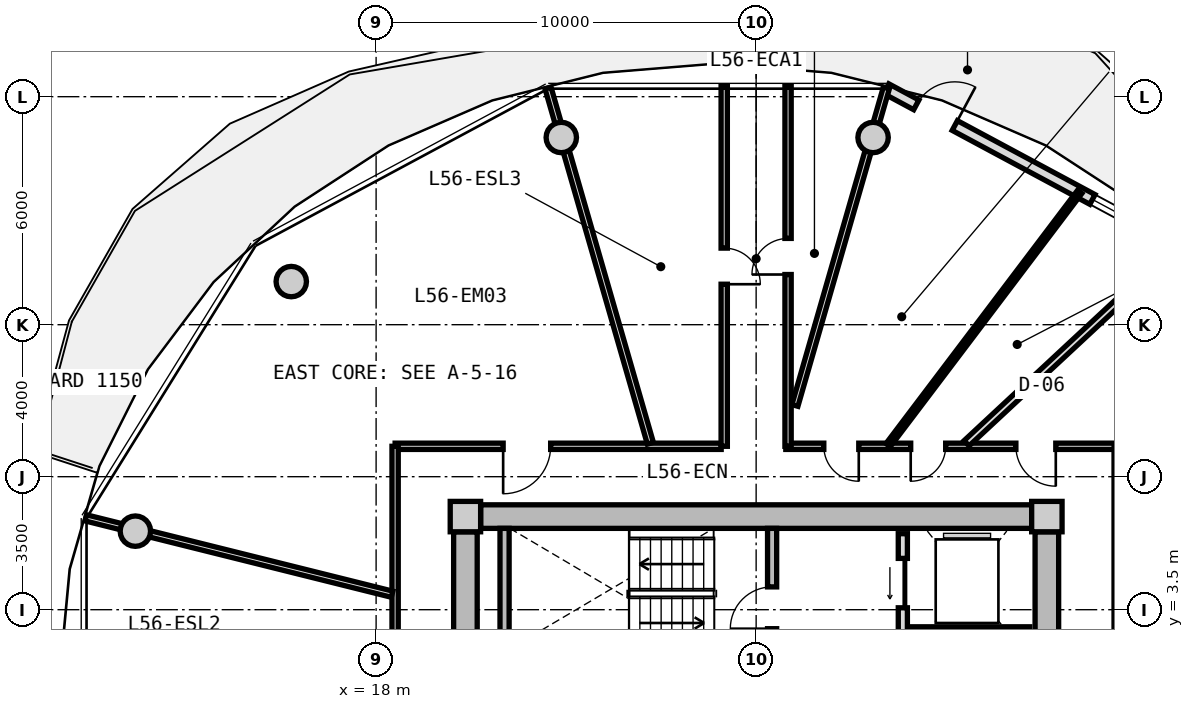
"""IFC4 building model, lengths in metres.
Left out: names, types, materials, properties, quantities, classifications, styles, units other than length and angle.
Written with IfcOpenShell. Run it as: python <this file> out.ifc"""

import sys

from ifc_helpers import new_model, si_unit, direction, frame, frame_2d, origin, origin_2d, place, context, subcontext, project, spatial, rectangle, circle, extrude, source, transform, mapped, element, fill, save


model = new_model("IFC4")
c1 = context("Model", 3, precision=1e-05, world=origin(), true_north=direction((0.0, 1.0)))
c2 = subcontext(c1, "Body", "Model", "MODEL_VIEW")
j1 = project(units=[si_unit("LENGTHUNIT", "METRE"), si_unit("PLANEANGLEUNIT", "RADIAN")], contexts=[c1])
p1 = place(None, origin())
s1 = spatial("IfcSite", under=j1, at=p1, CompositionType="ELEMENT")
p2 = place(p1, origin())
s2 = spatial("IfcBuilding", under=s1, at=p2, CompositionType="ELEMENT")
p3 = place(p2, frame((0.0, 0.0, 180.05)))
s3 = spatial("IfcBuildingStorey", under=s2, at=p3, CompositionType="ELEMENT", Elevation=180.05)
m1 = source(origin(), c2, "Body", "SweptSolid", [
    extrude(rectangle(XDim=0.8, YDim=0.8, at=origin_2d()), origin(), (0.0, 0.0, 1.0), 3.05),
])
for number, where, z_axis, x_axis in (
    (1, (35.65, 5.95, 0.0), (0.0, 0.0, 1.0), (1.0, 0.0, 0.0)),
    (2, (20.35, 5.95, 0.0), (0.0, 0.0, 1.0), (1.0, 0.0, 0.0)),
):
    element("IfcColumn", number, at=place(p3, frame(where, z_axis=z_axis, x_axis=x_axis)), inside=s3, PredefinedType="COLUMN", context=c2, shape_type="MappedRepresentation", body=[
        mapped(m1, transform((0.0, 0.0, 0.0), x_axis=(1.0, 0.0, 0.0), y_axis=(0.0, 1.0, 0.0), z_axis=(0.0, 0.0, 1.0), scale=1.0)),
    ])
m2 = source(origin(), c2, "Body", "SweptSolid", [
    extrude(rectangle(XDim=14.5, YDim=0.62, at=frame_2d((7.25, 0.0))), origin(), (0.0, 0.0, 1.0), 2.81),
])
p4 = place(p3, frame((20.75, 5.95, 0.0), z_axis=(0.0, 0.0, 1.0), x_axis=(1.0, 0.0, 0.0)))
e3 = element("IfcWall", 3, at=p4, inside=s3, PredefinedType="SHEAR", context=c2, shape_type="MappedRepresentation", body=[
    mapped(m2, transform((0.0, 0.0, 0.0), x_axis=(1.0, 0.0, 0.0), y_axis=(0.0, 1.0, 0.0), z_axis=(0.0, 0.0, 1.0), scale=1.0)),
])
m3 = source(origin(), c2, "Body", "SweptSolid", [
    extrude(rectangle(XDim=11.1, YDim=0.62, at=frame_2d((5.55, 0.0))), origin(), (0.0, 0.0, 1.0), 2.81),
])
p5 = place(p3, frame((20.35, -5.55, 0.0), z_axis=(0.0, 0.0, 1.0), x_axis=(0.0, 1.0, 0.0)))
e4 = element("IfcWall", 4, at=p5, inside=s3, PredefinedType="SHEAR", context=c2, shape_type="MappedRepresentation", body=[
    mapped(m3, transform((0.0, 0.0, 0.0), x_axis=(1.0, 0.0, 0.0), y_axis=(0.0, 1.0, 0.0), z_axis=(0.0, 0.0, 1.0), scale=1.0)),
])
p6 = place(p5, frame((3.8, 0.0, 0.0)))
e5 = element("IfcOpeningElement", 5, at=p6, cuts=e4, PredefinedType="OPENING", context=c2, shape_type="SweptSolid", body=[
    extrude(rectangle(XDim=1.2, YDim=2.15, at=frame_2d((0.6, 1.075))), frame((0.0, 0.32, 0.0), z_axis=(0.0, -1.0, 0.0), x_axis=(1.0, 0.0, 0.0)), (0.0, 0.0, 1.0), 0.64),
])
p7 = place(p3, frame((35.65, 5.55, 0.0), z_axis=(0.0, 0.0, 1.0), x_axis=(0.0, -1.0, 0.0)))
e6 = element("IfcWall", 6, at=p7, inside=s3, PredefinedType="SHEAR", context=c2, shape_type="MappedRepresentation", body=[
    mapped(m3, transform((0.0, 0.0, 0.0), x_axis=(1.0, 0.0, 0.0), y_axis=(0.0, 1.0, 0.0), z_axis=(0.0, 0.0, 1.0), scale=1.0)),
])
p8 = place(p7, frame((5.65, 0.0, 0.0)))
e7 = element("IfcOpeningElement", 7, at=p8, cuts=e6, PredefinedType="OPENING", context=c2, shape_type="SweptSolid", body=[
    extrude(rectangle(XDim=1.2, YDim=2.15, at=frame_2d((0.6, 1.075))), frame((0.0, 0.32, 0.0), z_axis=(0.0, -1.0, 0.0), x_axis=(1.0, 0.0, 0.0)), (0.0, 0.0, 1.0), 0.64),
])
m4 = source(origin(), c2, "Body", "SweptSolid", [
    extrude(circle(Radius=0.4, at=origin_2d()), origin(), (0.0, 0.0, 1.0), 3.05),
])
for number, where, z_axis, x_axis in (
    (8, (31.077, 15.926, 0.0), (0.0, 0.0, 1.0), (1.0, 0.0, 0.0)),
    (9, (22.873, 15.926, 0.0), (0.0, 0.0, 1.0), (1.0, 0.0, 0.0)),
    (10, (15.767, 12.135, 0.0), (0.0, 0.0, 1.0), (1.0, 0.0, 0.0)),
    (11, (11.665, 5.567, 0.0), (0.0, 0.0, 1.0), (1.0, 0.0, 0.0)),
):
    element("IfcColumn", number, at=place(p3, frame(where, z_axis=z_axis, x_axis=x_axis)), inside=s3, PredefinedType="COLUMN", context=c2, shape_type="MappedRepresentation", body=[
        mapped(m4, transform((0.0, 0.0, 0.0), x_axis=(1.0, 0.0, 0.0), y_axis=(0.0, 1.0, 0.0), z_axis=(0.0, 0.0, 1.0), scale=1.0)),
    ])
m5 = source(origin(), c2, "Body", "SweptSolid", [
    extrude(rectangle(XDim=8.742, YDim=0.29, at=frame_2d((4.371, 0.0))), origin(), (0.0, 0.0, 1.0), 2.81),
])
p9 = place(p3, frame((31.422, 17.211, 0.0), z_axis=(0.0, 0.0, 1.0), x_axis=(0.880992489116, -0.473130250693, 0.0)))
e12 = element("IfcWall", 12, at=p9, inside=s3, PredefinedType="SOLIDWALL", context=c2, shape_type="MappedRepresentation", body=[
    mapped(m5, transform((0.0, 0.0, 0.0), x_axis=(1.0, 0.0, 0.0), y_axis=(0.0, 1.0, 0.0), z_axis=(0.0, 0.0, 1.0), scale=1.0)),
])
p10 = place(p9, frame((0.9, 0.0, 0.0)))
e13 = element("IfcOpeningElement", 13, at=p10, cuts=e12, PredefinedType="OPENING", context=c2, shape_type="SweptSolid", body=[
    extrude(rectangle(XDim=1.15, YDim=2.25, at=frame_2d((0.575, 1.125))), frame((0.0, 0.155, 0.0), z_axis=(0.0, -1.0, 0.0), x_axis=(1.0, 0.0, 0.0)), (0.0, 0.0, 1.0), 0.31),
])
p11 = place(p9, frame((6.161, 0.0, 0.85)))
e14 = element("IfcOpeningElement", 14, at=p11, cuts=e12, PredefinedType="OPENING", context=c2, shape_type="SweptSolid", body=[
    extrude(rectangle(XDim=1.2, YDim=1.5, at=frame_2d((0.6, 0.75))), frame((0.0, 0.155, 0.0), z_axis=(0.0, -1.0, 0.0), x_axis=(1.0, 0.0, 0.0)), (0.0, 0.0, 1.0), 0.31),
])
m6 = source(origin(), c2, "Body", "SweptSolid", [
    extrude(rectangle(XDim=3.19, YDim=0.24, at=frame_2d((1.595, 0.0))), origin(), (0.0, 0.0, 1.0), 2.81),
])
p12 = place(p3, frame((21.38, 2.45, 0.0), z_axis=(0.0, 0.0, 1.0), x_axis=(0.0, 1.0, 0.0)))
e15 = element("IfcWall", 15, at=p12, inside=s3, PredefinedType="PARTITIONING", context=c2, shape_type="MappedRepresentation", body=[
    mapped(m6, transform((0.0, 0.0, 0.0), x_axis=(1.0, 0.0, 0.0), y_axis=(0.0, 1.0, 0.0), z_axis=(0.0, 0.0, 1.0), scale=1.0)),
])
p13 = place(p3, frame((28.42, 2.45, 0.0), z_axis=(0.0, 0.0, 1.0), x_axis=(0.0, 1.0, 0.0)))
e16 = element("IfcWall", 16, at=p13, inside=s3, PredefinedType="PARTITIONING", context=c2, shape_type="MappedRepresentation", body=[
    mapped(m6, transform((0.0, 0.0, 0.0), x_axis=(1.0, 0.0, 0.0), y_axis=(0.0, 1.0, 0.0), z_axis=(0.0, 0.0, 1.0), scale=1.0)),
])
p14 = place(p13, frame((0.55, 0.0, 0.0)))
e17 = element("IfcOpeningElement", 17, at=p14, cuts=e16, PredefinedType="OPENING", context=c2, shape_type="SweptSolid", body=[
    extrude(rectangle(XDim=1.1, YDim=2.15, at=frame_2d((0.55, 1.075))), frame((0.0, 0.13, 0.0), z_axis=(0.0, -1.0, 0.0), x_axis=(1.0, 0.0, 0.0)), (0.0, 0.0, 1.0), 0.26),
])
m7 = source(origin(), c2, "Body", "SweptSolid", [
    extrude(rectangle(XDim=5.0, YDim=0.24, at=frame_2d((2.5, 0.0))), origin(), (0.0, 0.0, 1.0), 2.795),
])
p15 = place(p3, frame((31.86, 0.5, 0.0), z_axis=(0.0, 0.0, 1.0), x_axis=(0.0, 1.0, 0.0)))
e18 = element("IfcWall", 18, at=p15, inside=s3, PredefinedType="PARTITIONING", context=c2, shape_type="MappedRepresentation", body=[
    mapped(m7, transform((0.0, 0.0, 0.0), x_axis=(1.0, 0.0, 0.0), y_axis=(0.0, 1.0, 0.0), z_axis=(0.0, 0.0, 1.0), scale=1.0)),
])
p16 = place(p15, frame((3.05, 0.0, 0.0)))
e19 = element("IfcOpeningElement", 19, at=p16, cuts=e18, PredefinedType="OPENING", context=c2, shape_type="SweptSolid", body=[
    extrude(rectangle(XDim=1.3, YDim=2.2, at=frame_2d((0.65, 1.1))), frame((0.0, 0.13, 0.0), z_axis=(0.0, -1.0, 0.0), x_axis=(1.0, 0.0, 0.0)), (0.0, 0.0, 1.0), 0.26),
])
p17 = place(p15, frame((0.55, 0.0, 0.0)))
e20 = element("IfcOpeningElement", 20, at=p17, cuts=e18, PredefinedType="OPENING", context=c2, shape_type="SweptSolid", body=[
    extrude(rectangle(XDim=1.3, YDim=2.2, at=frame_2d((0.65, 1.1))), frame((0.0, 0.13, 0.0), z_axis=(0.0, -1.0, 0.0), x_axis=(1.0, 0.0, 0.0)), (0.0, 0.0, 1.0), 0.26),
])
m8 = source(origin(), c2, "Body", "SweptSolid", [
    extrude(rectangle(XDim=3.2, YDim=0.2, at=frame_2d((1.6, 0.0))), origin(), (0.0, 0.0, 1.0), 2.795),
])
p18 = place(p3, frame((32.0, 2.95, 0.0), z_axis=(0.0, 0.0, 1.0), x_axis=(1.0, 0.0, 0.0)))
e21 = element("IfcWall", 21, at=p18, inside=s3, PredefinedType="PARTITIONING", context=c2, shape_type="MappedRepresentation", body=[
    mapped(m8, transform((0.0, 0.0, 0.0), x_axis=(1.0, 0.0, 0.0), y_axis=(0.0, 1.0, 0.0), z_axis=(0.0, 0.0, 1.0), scale=1.0)),
])
m9 = source(origin(), c2, "Body", "SweptSolid", [
    extrude(rectangle(XDim=8.58, YDim=0.165, at=frame_2d((4.29, 0.0))), origin(), (0.0, 0.0, 1.0), 2.795),
])
p19 = place(p3, frame((18.5, 7.8, 0.0), z_axis=(0.0, 0.0, 1.0), x_axis=(1.0, 0.0, 0.0)))
e22 = element("IfcWall", 22, at=p19, inside=s3, PredefinedType="PARTITIONING", context=c2, shape_type="MappedRepresentation", body=[
    mapped(m9, transform((0.0, 0.0, 0.0), x_axis=(1.0, 0.0, 0.0), y_axis=(0.0, 1.0, 0.0), z_axis=(0.0, 0.0, 1.0), scale=1.0)),
])
p20 = place(p19, frame((2.843, 0.0, 0.0)))
e23 = element("IfcOpeningElement", 23, at=p20, cuts=e22, PredefinedType="OPENING", context=c2, shape_type="SweptSolid", body=[
    extrude(rectangle(XDim=1.25, YDim=2.2, at=frame_2d((0.625, 1.1))), frame((0.0, 0.093, 0.0), z_axis=(0.0, -1.0, 0.0), x_axis=(1.0, 0.0, 0.0)), (0.0, 0.0, 1.0), 0.185),
])
m10 = source(origin(), c2, "Body", "SweptSolid", [
    extrude(rectangle(XDim=8.719, YDim=0.165, at=frame_2d((4.36, 0.0))), origin(), (0.0, 0.0, 1.0), 2.795),
])
p21 = place(p3, frame((28.781, 7.8, 0.0), z_axis=(0.0, 0.0, 1.0), x_axis=(1.0, 0.0, 0.0)))
e24 = element("IfcWall", 24, at=p21, inside=s3, PredefinedType="PARTITIONING", context=c2, shape_type="MappedRepresentation", body=[
    mapped(m10, transform((0.0, 0.0, 0.0), x_axis=(1.0, 0.0, 0.0), y_axis=(0.0, 1.0, 0.0), z_axis=(0.0, 0.0, 1.0), scale=1.0)),
])
p22 = place(p21, frame((6.054, 0.0, 0.0)))
e25 = element("IfcOpeningElement", 25, at=p22, cuts=e24, PredefinedType="OPENING", context=c2, shape_type="SweptSolid", body=[
    extrude(rectangle(XDim=1.05, YDim=2.15, at=frame_2d((0.525, 1.075))), frame((0.0, 0.093, 0.0), z_axis=(0.0, -1.0, 0.0), x_axis=(1.0, 0.0, 0.0)), (0.0, 0.0, 1.0), 0.185),
])
p23 = place(p21, frame((3.287, 0.0, 0.0)))
e26 = element("IfcOpeningElement", 26, at=p23, cuts=e24, PredefinedType="OPENING", context=c2, shape_type="SweptSolid", body=[
    extrude(rectangle(XDim=0.92, YDim=2.1, at=frame_2d((0.46, 1.05))), frame((0.0, 0.093, 0.0), z_axis=(0.0, -1.0, 0.0), x_axis=(1.0, 0.0, 0.0)), (0.0, 0.0, 1.0), 0.185),
])
p24 = place(p21, frame((1.0, 0.0, 0.0)))
e27 = element("IfcOpeningElement", 27, at=p24, cuts=e24, PredefinedType="OPENING", context=c2, shape_type="SweptSolid", body=[
    extrude(rectangle(XDim=0.92, YDim=2.1, at=frame_2d((0.46, 1.05))), frame((0.0, 0.093, 0.0), z_axis=(0.0, -1.0, 0.0), x_axis=(1.0, 0.0, 0.0)), (0.0, 0.0, 1.0), 0.185),
])
m11 = source(origin(), c2, "Body", "SweptSolid", [
    extrude(rectangle(XDim=6.88, YDim=0.165, at=frame_2d((3.44, 0.0))), origin(), (0.0, 0.0, 1.0), 2.795),
])
p25 = place(p3, frame((18.5, 0.92, 0.0), z_axis=(0.0, 0.0, 1.0), x_axis=(0.0, 1.0, 0.0)))
e28 = element("IfcWall", 28, at=p25, inside=s3, PredefinedType="PARTITIONING", context=c2, shape_type="MappedRepresentation", body=[
    mapped(m11, transform((0.0, 0.0, 0.0), x_axis=(1.0, 0.0, 0.0), y_axis=(0.0, 1.0, 0.0), z_axis=(0.0, 0.0, 1.0), scale=1.0)),
])
m12 = source(origin(), c2, "Body", "SweptSolid", [
    extrude(rectangle(XDim=8.695, YDim=0.165, at=frame_2d((4.348, 0.0))), origin(), (0.0, 0.0, 1.0), 2.345),
])
p26 = place(p3, frame((29.02, 8.875, 0.0), z_axis=(0.0, 0.0, 1.0), x_axis=(0.276797231892, 0.960928349263, 0.0)))
e29 = element("IfcWall", 29, at=p26, inside=s3, PredefinedType="PARTITIONING", context=c2, shape_type="MappedRepresentation", body=[
    mapped(m12, transform((0.0, 0.0, 0.0), x_axis=(1.0, 0.0, 0.0), y_axis=(0.0, 1.0, 0.0), z_axis=(0.0, 0.0, 1.0), scale=1.0)),
])
m13 = source(origin(), c2, "Body", "SweptSolid", [
    extrude(rectangle(XDim=9.73, YDim=0.165, at=frame_2d((4.865, 0.0))), origin(), (0.0, 0.0, 1.0), 2.435),
])
p27 = place(p3, frame((25.217, 7.88, 0.0), z_axis=(0.0, 0.0, 1.0), x_axis=(-0.27679492614, 0.960929013436, 0.0)))
e30 = element("IfcWall", 30, at=p27, inside=s3, PredefinedType="PARTITIONING", context=c2, shape_type="MappedRepresentation", body=[
    mapped(m13, transform((0.0, 0.0, 0.0), x_axis=(1.0, 0.0, 0.0), y_axis=(0.0, 1.0, 0.0), z_axis=(0.0, 0.0, 1.0), scale=1.0)),
])
m14 = source(origin(), c2, "Body", "SweptSolid", [
    extrude(rectangle(XDim=8.305, YDim=0.165, at=frame_2d((4.153, 0.0))), origin(), (0.0, 0.0, 1.0), 2.345),
])
p28 = place(p3, frame((18.42, 3.908, 0.0), z_axis=(0.0, 0.0, 1.0), x_axis=(-0.970309994378, 0.241864662175, 0.0)))
e31 = element("IfcWall", 31, at=p28, inside=s3, PredefinedType="PARTITIONING", context=c2, shape_type="MappedRepresentation", body=[
    mapped(m14, transform((0.0, 0.0, 0.0), x_axis=(1.0, 0.0, 0.0), y_axis=(0.0, 1.0, 0.0), z_axis=(0.0, 0.0, 1.0), scale=1.0)),
])
m15 = source(origin(), c2, "Body", "SweptSolid", [
    extrude(rectangle(XDim=9.48, YDim=0.165, at=frame_2d((4.74, 0.0))), origin(), (0.0, 0.0, 1.0), 2.795),
])
p29 = place(p3, frame((27.16, 7.8, 0.0), z_axis=(0.0, 0.0, 1.0), x_axis=(0.0, 1.0, 0.0)))
e32 = element("IfcWall", 32, at=p29, inside=s3, PredefinedType="PARTITIONING", context=c2, shape_type="MappedRepresentation", body=[
    mapped(m15, transform((0.0, 0.0, 0.0), x_axis=(1.0, 0.0, 0.0), y_axis=(0.0, 1.0, 0.0), z_axis=(0.0, 0.0, 1.0), scale=1.0)),
])
p30 = place(p29, frame((4.265, 0.0, 0.0)))
e33 = element("IfcOpeningElement", 33, at=p30, cuts=e32, PredefinedType="OPENING", context=c2, shape_type="SweptSolid", body=[
    extrude(rectangle(XDim=0.95, YDim=2.1, at=frame_2d((0.475, 1.05))), frame((0.0, 0.093, 0.0), z_axis=(0.0, -1.0, 0.0), x_axis=(1.0, 0.0, 0.0)), (0.0, 0.0, 1.0), 0.185),
])
p31 = place(p3, frame((28.84, 17.28, 0.0), z_axis=(0.0, 0.0, 1.0), x_axis=(0.0, -1.0, 0.0)))
e34 = element("IfcWall", 34, at=p31, inside=s3, PredefinedType="PARTITIONING", context=c2, shape_type="MappedRepresentation", body=[
    mapped(m15, transform((0.0, 0.0, 0.0), x_axis=(1.0, 0.0, 0.0), y_axis=(0.0, 1.0, 0.0), z_axis=(0.0, 0.0, 1.0), scale=1.0)),
])
p32 = place(p31, frame((4.01, 0.0, 0.0)))
e35 = element("IfcOpeningElement", 35, at=p32, cuts=e34, PredefinedType="OPENING", context=c2, shape_type="SweptSolid", body=[
    extrude(rectangle(XDim=0.95, YDim=2.1, at=frame_2d((0.475, 1.05))), frame((0.0, 0.093, 0.0), z_axis=(0.0, -1.0, 0.0), x_axis=(1.0, 0.0, 0.0)), (0.0, 0.0, 1.0), 0.185),
])
m16 = source(origin(), c2, "Body", "SweptSolid", [
    extrude(rectangle(XDim=7.648, YDim=0.19, at=frame_2d((3.824, 0.0))), origin(), (0.0, 0.0, 1.0), 2.345),
])
p33 = place(p3, frame((33.538, 7.88, 0.0), z_axis=(0.0, 0.0, 1.0), x_axis=(0.732167856666, 0.681124239522, 0.0)))
e36 = element("IfcWall", 36, at=p33, inside=s3, PredefinedType="PARTITIONING", context=c2, shape_type="MappedRepresentation", body=[
    mapped(m16, transform((0.0, 0.0, 0.0), x_axis=(1.0, 0.0, 0.0), y_axis=(0.0, 1.0, 0.0), z_axis=(0.0, 0.0, 1.0), scale=1.0)),
])
m17 = source(origin(), c2, "Body", "SweptSolid", [
    extrude(rectangle(XDim=8.359, YDim=0.14, at=frame_2d((4.18, 0.0))), origin(), (0.0, 0.0, 1.0), 2.795),
])
p34 = place(p3, frame((31.473, 7.83, 0.0), z_axis=(0.0, 0.0, 1.0), x_axis=(0.603265985309, 0.797540062297, 0.0)))
e37 = element("IfcWall", 37, at=p34, inside=s3, PredefinedType="PARTITIONING", context=c2, shape_type="MappedRepresentation", body=[
    mapped(m17, transform((0.0, 0.0, 0.0), x_axis=(1.0, 0.0, 0.0), y_axis=(0.0, 1.0, 0.0), z_axis=(0.0, 0.0, 1.0), scale=1.0)),
])
m18 = source(origin(), c2, "Body", "SweptSolid", [
    extrude(rectangle(XDim=1.15, YDim=2.25, at=frame_2d((0.575, 1.125))), frame((0.0, 0.025, 0.0), z_axis=(0.0, -1.0, 0.0), x_axis=(1.0, 0.0, 0.0)), (0.0, 0.0, 1.0), 0.05),
])
p35 = place(p10, origin())
e38 = element("IfcDoor", 38, at=p35, inside=s3, OperationType="SINGLE_SWING_RIGHT", PredefinedType="DOOR", context=c2, shape_type="MappedRepresentation", body=[
    mapped(m18, transform((0.0, 0.0, 0.0), x_axis=(1.0, 0.0, 0.0), y_axis=(0.0, 1.0, 0.0), z_axis=(0.0, 0.0, 1.0), scale=1.0)),
])
fill(e13, e38)
m19 = source(origin(), c2, "Body", "SweptSolid", [
    extrude(rectangle(XDim=1.2, YDim=1.5, at=frame_2d((0.6, 0.75))), frame((0.0, 0.03, 0.0), z_axis=(0.0, -1.0, 0.0), x_axis=(1.0, 0.0, 0.0)), (0.0, 0.0, 1.0), 0.06),
])
p36 = place(p11, origin())
e39 = element("IfcWindow", 39, at=p36, inside=s3, PartitioningType="SINGLE_PANEL", PredefinedType="WINDOW", context=c2, shape_type="MappedRepresentation", body=[
    mapped(m19, transform((0.0, 0.0, 0.0), x_axis=(1.0, 0.0, 0.0), y_axis=(0.0, 1.0, 0.0), z_axis=(0.0, 0.0, 1.0), scale=1.0)),
])
fill(e14, e39)
m20 = source(origin(), c2, "Body", "SweptSolid", [
    extrude(rectangle(XDim=1.1, YDim=2.15, at=frame_2d((0.55, 1.075))), frame((0.0, 0.025, 0.0), z_axis=(0.0, -1.0, 0.0), x_axis=(1.0, 0.0, 0.0)), (0.0, 0.0, 1.0), 0.05),
])
p37 = place(p14, origin())
e40 = element("IfcDoor", 40, at=p37, inside=s3, OperationType="SINGLE_SWING_LEFT", PredefinedType="DOOR", context=c2, shape_type="MappedRepresentation", body=[
    mapped(m20, transform((0.0, 0.0, 0.0), x_axis=(1.0, 0.0, 0.0), y_axis=(0.0, 1.0, 0.0), z_axis=(0.0, 0.0, 1.0), scale=1.0)),
])
fill(e17, e40)
m21 = source(origin(), c2, "Body", "SweptSolid", [
    extrude(rectangle(XDim=1.3, YDim=2.2, at=frame_2d((0.65, 1.1))), frame((0.0, 0.025, 0.0), z_axis=(0.0, -1.0, 0.0), x_axis=(1.0, 0.0, 0.0)), (0.0, 0.0, 1.0), 0.05),
])
p38 = place(p16, origin())
e41 = element("IfcDoor", 41, at=p38, inside=s3, OperationType="SLIDING_TO_LEFT", PredefinedType="DOOR", context=c2, shape_type="MappedRepresentation", body=[
    mapped(m21, transform((0.0, 0.0, 0.0), x_axis=(1.0, 0.0, 0.0), y_axis=(0.0, 1.0, 0.0), z_axis=(0.0, 0.0, 1.0), scale=1.0)),
])
fill(e19, e41)
m22 = source(origin(), c2, "Body", "SweptSolid", [
    extrude(rectangle(XDim=0.95, YDim=2.1, at=frame_2d((0.475, 1.05))), frame((0.0, 0.025, 0.0), z_axis=(0.0, -1.0, 0.0), x_axis=(1.0, 0.0, 0.0)), (0.0, 0.0, 1.0), 0.05),
])
p39 = place(p30, frame((0.95, 0.0, 0.0), z_axis=(0.0, 0.0, 1.0), x_axis=(-1.0, 0.0, 0.0)))
e42 = element("IfcDoor", 42, at=p39, inside=s3, OperationType="SINGLE_SWING_RIGHT", PredefinedType="DOOR", context=c2, shape_type="MappedRepresentation", body=[
    mapped(m22, transform((0.0, 0.0, 0.0), x_axis=(1.0, 0.0, 0.0), y_axis=(0.0, 1.0, 0.0), z_axis=(0.0, 0.0, 1.0), scale=1.0)),
])
fill(e33, e42)
p40 = place(p32, frame((0.95, 0.0, 0.0), z_axis=(0.0, 0.0, 1.0), x_axis=(-1.0, 0.0, 0.0)))
e43 = element("IfcDoor", 43, at=p40, inside=s3, OperationType="SINGLE_SWING_LEFT", PredefinedType="DOOR", context=c2, shape_type="MappedRepresentation", body=[
    mapped(m22, transform((0.0, 0.0, 0.0), x_axis=(1.0, 0.0, 0.0), y_axis=(0.0, 1.0, 0.0), z_axis=(0.0, 0.0, 1.0), scale=1.0)),
])
fill(e35, e43)
m23 = source(origin(), c2, "Body", "SweptSolid", [
    extrude(rectangle(XDim=1.05, YDim=2.15, at=frame_2d((0.525, 1.075))), frame((0.0, 0.025, 0.0), z_axis=(0.0, -1.0, 0.0), x_axis=(1.0, 0.0, 0.0)), (0.0, 0.0, 1.0), 0.05),
])
p41 = place(p22, frame((1.05, 0.0, 0.0), z_axis=(0.0, 0.0, 1.0), x_axis=(-1.0, 0.0, 0.0)))
e44 = element("IfcDoor", 44, at=p41, inside=s3, OperationType="SINGLE_SWING_LEFT", PredefinedType="DOOR", context=c2, shape_type="MappedRepresentation", body=[
    mapped(m23, transform((0.0, 0.0, 0.0), x_axis=(1.0, 0.0, 0.0), y_axis=(0.0, 1.0, 0.0), z_axis=(0.0, 0.0, 1.0), scale=1.0)),
])
fill(e25, e44)
m24 = source(origin(), c2, "Body", "SweptSolid", [
    extrude(rectangle(XDim=0.92, YDim=2.1, at=frame_2d((0.46, 1.05))), frame((0.0, 0.025, 0.0), z_axis=(0.0, -1.0, 0.0), x_axis=(1.0, 0.0, 0.0)), (0.0, 0.0, 1.0), 0.05),
])
p42 = place(p23, frame((0.92, 0.0, 0.0), z_axis=(0.0, 0.0, 1.0), x_axis=(-1.0, 0.0, 0.0)))
e45 = element("IfcDoor", 45, at=p42, inside=s3, OperationType="SINGLE_SWING_RIGHT", PredefinedType="DOOR", context=c2, shape_type="MappedRepresentation", body=[
    mapped(m24, transform((0.0, 0.0, 0.0), x_axis=(1.0, 0.0, 0.0), y_axis=(0.0, 1.0, 0.0), z_axis=(0.0, 0.0, 1.0), scale=1.0)),
])
fill(e26, e45)
p43 = place(p24, frame((0.92, 0.0, 0.0), z_axis=(0.0, 0.0, 1.0), x_axis=(-1.0, 0.0, 0.0)))
e46 = element("IfcDoor", 46, at=p43, inside=s3, OperationType="SINGLE_SWING_LEFT", PredefinedType="DOOR", context=c2, shape_type="MappedRepresentation", body=[
    mapped(m24, transform((0.0, 0.0, 0.0), x_axis=(1.0, 0.0, 0.0), y_axis=(0.0, 1.0, 0.0), z_axis=(0.0, 0.0, 1.0), scale=1.0)),
])
fill(e27, e46)
m25 = source(origin(), c2, "Body", "SweptSolid", [
    extrude(rectangle(XDim=1.25, YDim=2.2, at=frame_2d((0.625, 1.1))), frame((0.0, 0.025, 0.0), z_axis=(0.0, -1.0, 0.0), x_axis=(1.0, 0.0, 0.0)), (0.0, 0.0, 1.0), 0.05),
])
p44 = place(p20, frame((1.25, 0.0, 0.0), z_axis=(0.0, 0.0, 1.0), x_axis=(-1.0, 0.0, 0.0)))
e47 = element("IfcDoor", 47, at=p44, inside=s3, OperationType="SINGLE_SWING_RIGHT", PredefinedType="DOOR", context=c2, shape_type="MappedRepresentation", body=[
    mapped(m25, transform((0.0, 0.0, 0.0), x_axis=(1.0, 0.0, 0.0), y_axis=(0.0, 1.0, 0.0), z_axis=(0.0, 0.0, 1.0), scale=1.0)),
])
fill(e23, e47)
save(model, sys.argv[1])
